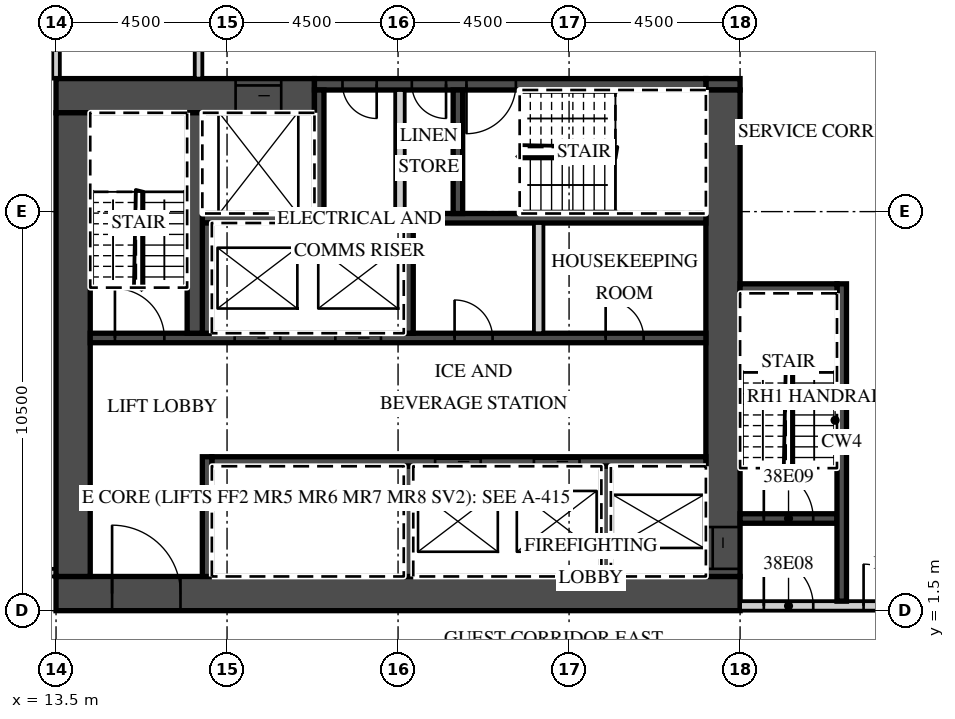
"""IFC4 building model, lengths in metres.
Left out: names, types, materials, properties, quantities, classifications, styles, units other than length and angle.
Written with IfcOpenShell. Run it as: python <this file> out.ifc"""

import sys

from ifc_helpers import new_model, si_unit, direction, frame, frame_2d, origin, place, context, subcontext, project, spatial, rectangle, extrude, element, fill, save


model = new_model("IFC4")
c1 = context("Model", 3, precision=1e-05, world=origin(), true_north=direction((0.0, 1.0)))
c2 = subcontext(c1, "Body", "Model", "MODEL_VIEW")
j1 = project(units=[si_unit("LENGTHUNIT", "METRE"), si_unit("PLANEANGLEUNIT", "RADIAN")], contexts=[c1])
p1 = place(None, origin())
s1 = spatial("IfcSite", under=j1, at=p1, CompositionType="ELEMENT")
p2 = place(p1, origin())
s2 = spatial("IfcBuilding", under=s1, at=p2, CompositionType="ELEMENT")
p3 = place(p2, frame((0.0, 0.0, 166.9)))
s3 = spatial("IfcBuildingStorey", under=s2, at=p3, CompositionType="ELEMENT", Elevation=166.9)
p4 = place(p3, frame((13.5, 15.5, 0.0), z_axis=(0.0, 0.0, 1.0), x_axis=(0.0, 1.0, 0.0)))
e1 = element("IfcWall", 1, at=p4, inside=s3, PredefinedType="PARTITIONING", context=c2, shape_type="SweptSolid", body=[
    extrude(rectangle(XDim=6.089, YDim=0.2, at=frame_2d((3.044, 0.0))), origin(), (0.0, 0.0, 1.0), 3.02),
])
p5 = place(p3, frame((-13.5, 2.5, 0.0), z_axis=(0.0, 0.0, 1.0), x_axis=(1.0, 0.0, 0.0)))
e2 = element("IfcWall", 2, at=p5, inside=s3, PredefinedType="PARTITIONING", context=c2, shape_type="SweptSolid", body=[
    extrude(rectangle(XDim=27.0, YDim=0.2, at=frame_2d((13.5, 0.0))), origin(), (0.0, 0.0, 1.0), 3.02),
])
p6 = place(p5, frame((0.575, 0.0, 0.0)))
e3 = element("IfcOpeningElement", 3, at=p6, cuts=e2, PredefinedType="OPENING", context=c2, shape_type="SweptSolid", body=[
    extrude(rectangle(XDim=1.0, YDim=2.1, at=frame_2d((0.5, 1.05))), frame((0.0, 0.11, 0.0), z_axis=(0.0, -1.0, 0.0), x_axis=(1.0, 0.0, 0.0)), (0.0, 0.0, 1.0), 0.22),
])
p7 = place(p5, frame((7.45, 0.0, 0.0)))
e4 = element("IfcOpeningElement", 4, at=p7, cuts=e2, PredefinedType="OPENING", context=c2, shape_type="SweptSolid", body=[
    extrude(rectangle(XDim=1.0, YDim=2.1, at=frame_2d((0.5, 1.05))), frame((0.0, 0.11, 0.0), z_axis=(0.0, -1.0, 0.0), x_axis=(1.0, 0.0, 0.0)), (0.0, 0.0, 1.0), 0.22),
])
p8 = place(p5, frame((11.925, 0.0, 0.0)))
e5 = element("IfcOpeningElement", 5, at=p8, cuts=e2, PredefinedType="OPENING", context=c2, shape_type="SweptSolid", body=[
    extrude(rectangle(XDim=1.0, YDim=2.1, at=frame_2d((0.5, 1.05))), frame((0.0, 0.11, 0.0), z_axis=(0.0, -1.0, 0.0), x_axis=(1.0, 0.0, 0.0)), (0.0, 0.0, 1.0), 0.22),
])
p9 = place(p5, frame((15.938, 0.0, 0.0)))
e6 = element("IfcOpeningElement", 6, at=p9, cuts=e2, PredefinedType="OPENING", context=c2, shape_type="SweptSolid", body=[
    extrude(rectangle(XDim=1.2, YDim=2.1, at=frame_2d((0.6, 1.05))), frame((0.0, 0.11, 0.0), z_axis=(0.0, -1.0, 0.0), x_axis=(1.0, 0.0, 0.0)), (0.0, 0.0, 1.0), 0.22),
])
p10 = place(p5, frame((25.425, 0.0, 0.0)))
e7 = element("IfcOpeningElement", 7, at=p10, cuts=e2, PredefinedType="OPENING", context=c2, shape_type="SweptSolid", body=[
    extrude(rectangle(XDim=1.0, YDim=2.1, at=frame_2d((0.5, 1.05))), frame((0.0, 0.11, 0.0), z_axis=(0.0, -1.0, 0.0), x_axis=(1.0, 0.0, 0.0)), (0.0, 0.0, 1.0), 0.22),
])
p11 = place(p3, frame((13.5, 1.95, 0.0), z_axis=(0.0, 0.0, 1.0), x_axis=(1.0, 0.0, 0.0)))
e8 = element("IfcWall", 8, at=p11, inside=s3, PredefinedType="SHEAR", context=c2, shape_type="SweptSolid", body=[
    extrude(rectangle(XDim=18.0, YDim=0.9, at=frame_2d((9.0, 0.0))), origin(), (0.0, 0.0, 1.0), 3.02),
])
p12 = place(p11, frame((1.475, 0.0, 0.0)))
e9 = element("IfcOpeningElement", 9, at=p12, cuts=e8, PredefinedType="OPENING", context=c2, shape_type="SweptSolid", body=[
    extrude(rectangle(XDim=1.8, YDim=2.1, at=frame_2d((0.9, 1.05))), frame((0.0, 0.46, 0.0), z_axis=(0.0, -1.0, 0.0), x_axis=(1.0, 0.0, 0.0)), (0.0, 0.0, 1.0), 0.92),
])
p13 = place(p3, frame((13.5, 15.05, 0.0), z_axis=(0.0, 0.0, 1.0), x_axis=(1.0, 0.0, 0.0)))
e10 = element("IfcWall", 10, at=p13, inside=s3, PredefinedType="SHEAR", context=c2, shape_type="SweptSolid", body=[
    extrude(rectangle(XDim=6.8, YDim=0.9, at=frame_2d((3.4, 0.0))), origin(), (0.0, 0.0, 1.0), 3.02),
])
p14 = place(p13, frame((4.725, 0.0, 0.0)))
e11 = element("IfcOpeningElement", 11, at=p14, cuts=e10, PredefinedType="OPENING", context=c2, shape_type="SweptSolid", body=[
    extrude(rectangle(XDim=1.2, YDim=2.1, at=frame_2d((0.6, 1.05))), frame((0.0, 0.46, 0.0), z_axis=(0.0, -1.0, 0.0), x_axis=(1.0, 0.0, 0.0)), (0.0, 0.0, 1.0), 0.92),
])
p15 = place(p3, frame((30.6, 15.35, 0.0), z_axis=(0.0, 0.0, 1.0), x_axis=(1.0, 0.0, 0.0)))
e12 = element("IfcWall", 12, at=p15, inside=s3, PredefinedType="SHEAR", context=c2, shape_type="SweptSolid", body=[
    extrude(rectangle(XDim=0.9, YDim=0.3, at=frame_2d((0.45, 0.0))), origin(), (0.0, 0.0, 1.0), 3.02),
])
p16 = place(p3, frame((20.3, 15.35, 0.0), z_axis=(0.0, 0.0, 1.0), x_axis=(1.0, 0.0, 0.0)))
e13 = element("IfcWall", 13, at=p16, inside=s3, PredefinedType="SHEAR", context=c2, shape_type="SweptSolid", body=[
    extrude(rectangle(XDim=10.3, YDim=0.3, at=frame_2d((5.15, 0.0))), origin(), (0.0, 0.0, 1.0), 3.02),
])
p17 = place(p16, frame((4.0, 0.0, 0.0)))
e14 = element("IfcOpeningElement", 14, at=p17, cuts=e13, PredefinedType="OPENING", context=c2, shape_type="SweptSolid", body=[
    extrude(rectangle(XDim=1.3, YDim=2.1, at=frame_2d((0.65, 1.05))), frame((0.0, 0.16, 0.0), z_axis=(0.0, -1.0, 0.0), x_axis=(1.0, 0.0, 0.0)), (0.0, 0.0, 1.0), 0.32),
])
p18 = place(p16, frame((2.562, 0.0, 0.0)))
e15 = element("IfcOpeningElement", 15, at=p18, cuts=e13, PredefinedType="OPENING", context=c2, shape_type="SweptSolid", body=[
    extrude(rectangle(XDim=0.9, YDim=2.1, at=frame_2d((0.45, 1.05))), frame((0.0, 0.16, 0.0), z_axis=(0.0, -1.0, 0.0), x_axis=(1.0, 0.0, 0.0)), (0.0, 0.0, 1.0), 0.32),
])
p19 = place(p16, frame((0.738, 0.0, 0.0)))
e16 = element("IfcOpeningElement", 16, at=p19, cuts=e13, PredefinedType="OPENING", context=c2, shape_type="SweptSolid", body=[
    extrude(rectangle(XDim=0.9, YDim=2.1, at=frame_2d((0.45, 1.05))), frame((0.0, 0.16, 0.0), z_axis=(0.0, -1.0, 0.0), x_axis=(1.0, 0.0, 0.0)), (0.0, 0.0, 1.0), 0.32),
])
p20 = place(p3, frame((31.05, 2.4, 0.0), z_axis=(0.0, 0.0, 1.0), x_axis=(0.0, 1.0, 0.0)))
e17 = element("IfcWall", 17, at=p20, inside=s3, PredefinedType="SHEAR", context=c2, shape_type="SweptSolid", body=[
    extrude(rectangle(XDim=12.8, YDim=0.9, at=frame_2d((6.4, 0.0))), origin(), (0.0, 0.0, 1.0), 3.02),
])
p21 = place(p20, frame((0.2, 0.0, 0.0)))
e18 = element("IfcOpeningElement", 18, at=p21, cuts=e17, PredefinedType="OPENING", context=c2, shape_type="SweptSolid", body=[
    extrude(rectangle(XDim=1.1, YDim=2.1, at=frame_2d((0.55, 1.05))), frame((0.0, 0.46, 0.0), z_axis=(0.0, -1.0, 0.0), x_axis=(1.0, 0.0, 0.0)), (0.0, 0.0, 1.0), 0.92),
])
p22 = place(p3, frame((13.95, 2.4, 0.0), z_axis=(0.0, 0.0, 1.0), x_axis=(0.0, 1.0, 0.0)))
e19 = element("IfcWall", 19, at=p22, inside=s3, PredefinedType="SHEAR", context=c2, shape_type="SweptSolid", body=[
    extrude(rectangle(XDim=12.2, YDim=0.9, at=frame_2d((6.1, 0.0))), origin(), (0.0, 0.0, 1.0), 3.02),
])
p23 = place(p3, frame((17.6, 5.425, 0.0), z_axis=(0.0, 0.0, 1.0), x_axis=(1.0, 0.0, 0.0)))
e20 = element("IfcWall", 20, at=p23, inside=s3, PredefinedType="SHEAR", context=c2, shape_type="SweptSolid", body=[
    extrude(rectangle(XDim=13.0, YDim=0.25, at=frame_2d((6.5, 0.0))), origin(), (0.0, 0.0, 1.0), 3.02),
])
p24 = place(p23, frame((8.475, 0.0, 0.0)))
e21 = element("IfcOpeningElement", 21, at=p24, cuts=e20, PredefinedType="OPENING", context=c2, shape_type="SweptSolid", body=[
    extrude(rectangle(XDim=1.2, YDim=2.1, at=frame_2d((0.6, 1.05))), frame((0.0, 0.135, 0.0), z_axis=(0.0, -1.0, 0.0), x_axis=(1.0, 0.0, 0.0)), (0.0, 0.0, 1.0), 0.27),
])
p25 = place(p23, frame((5.875, 0.0, 0.0)))
e22 = element("IfcOpeningElement", 22, at=p25, cuts=e20, PredefinedType="OPENING", context=c2, shape_type="SweptSolid", body=[
    extrude(rectangle(XDim=1.2, YDim=2.1, at=frame_2d((0.6, 1.05))), frame((0.0, 0.135, 0.0), z_axis=(0.0, -1.0, 0.0), x_axis=(1.0, 0.0, 0.0)), (0.0, 0.0, 1.0), 0.27),
])
p26 = place(p3, frame((17.475, 2.4, 0.0), z_axis=(0.0, 0.0, 1.0), x_axis=(0.0, 1.0, 0.0)))
e23 = element("IfcWall", 23, at=p26, inside=s3, PredefinedType="SHEAR", context=c2, shape_type="SweptSolid", body=[
    extrude(rectangle(XDim=3.15, YDim=0.25, at=frame_2d((1.575, 0.0))), origin(), (0.0, 0.0, 1.0), 3.02),
])
for number, where, z_axis, x_axis in (
    (24, (27.975, 2.4, 0.0), (0.0, 0.0, 1.0), (0.0, 1.0, 0.0)),
    (25, (22.775, 2.4, 0.0), (0.0, 0.0, 1.0), (0.0, 1.0, 0.0)),
):
    element("IfcWall", number, at=place(p3, frame(where, z_axis=z_axis, x_axis=x_axis)), inside=s3, PredefinedType="SHEAR", context=c2, shape_type="SweptSolid", body=[
        extrude(rectangle(XDim=2.9, YDim=0.25, at=frame_2d((1.45, 0.0))), origin(), (0.0, 0.0, 1.0), 3.02),
    ])
p27 = place(p3, frame((14.4, 8.675, 0.0), z_axis=(0.0, 0.0, 1.0), x_axis=(1.0, 0.0, 0.0)))
e26 = element("IfcWall", 26, at=p27, inside=s3, PredefinedType="SHEAR", context=c2, shape_type="SweptSolid", body=[
    extrude(rectangle(XDim=16.2, YDim=0.25, at=frame_2d((8.1, 0.0))), origin(), (0.0, 0.0, 1.0), 3.02),
])
p28 = place(p27, frame((6.45, 0.0, 0.0)))
e27 = element("IfcOpeningElement", 27, at=p28, cuts=e26, PredefinedType="OPENING", context=c2, shape_type="SweptSolid", body=[
    extrude(rectangle(XDim=1.2, YDim=2.1, at=frame_2d((0.6, 1.05))), frame((0.0, 0.135, 0.0), z_axis=(0.0, -1.0, 0.0), x_axis=(1.0, 0.0, 0.0)), (0.0, 0.0, 1.0), 0.27),
])
p29 = place(p27, frame((3.8, 0.0, 0.0)))
e28 = element("IfcOpeningElement", 28, at=p29, cuts=e26, PredefinedType="OPENING", context=c2, shape_type="SweptSolid", body=[
    extrude(rectangle(XDim=1.2, YDim=2.1, at=frame_2d((0.6, 1.05))), frame((0.0, 0.135, 0.0), z_axis=(0.0, -1.0, 0.0), x_axis=(1.0, 0.0, 0.0)), (0.0, 0.0, 1.0), 0.27),
])
p30 = place(p27, frame((0.65, 0.0, 0.0)))
e29 = element("IfcOpeningElement", 29, at=p30, cuts=e26, PredefinedType="OPENING", context=c2, shape_type="SweptSolid", body=[
    extrude(rectangle(XDim=1.3, YDim=2.1, at=frame_2d((0.65, 1.05))), frame((0.0, 0.135, 0.0), z_axis=(0.0, -1.0, 0.0), x_axis=(1.0, 0.0, 0.0)), (0.0, 0.0, 1.0), 0.27),
])
p31 = place(p27, frame((13.562, 0.0, 0.0)))
e30 = element("IfcOpeningElement", 30, at=p31, cuts=e26, PredefinedType="OPENING", context=c2, shape_type="SweptSolid", body=[
    extrude(rectangle(XDim=1.0, YDim=2.1, at=frame_2d((0.5, 1.05))), frame((0.0, 0.135, 0.0), z_axis=(0.0, -1.0, 0.0), x_axis=(1.0, 0.0, 0.0)), (0.0, 0.0, 1.0), 0.27),
])
p32 = place(p27, frame((9.587, 0.0, 0.0)))
e31 = element("IfcOpeningElement", 31, at=p32, cuts=e26, PredefinedType="OPENING", context=c2, shape_type="SweptSolid", body=[
    extrude(rectangle(XDim=1.0, YDim=2.1, at=frame_2d((0.5, 1.05))), frame((0.0, 0.135, 0.0), z_axis=(0.0, -1.0, 0.0), x_axis=(1.0, 0.0, 0.0)), (0.0, 0.0, 1.0), 0.27),
])
p33 = place(p3, frame((17.35, 11.825, 0.0), z_axis=(0.0, 0.0, 1.0), x_axis=(1.0, 0.0, 0.0)))
e32 = element("IfcWall", 32, at=p33, inside=s3, PredefinedType="SHEAR", context=c2, shape_type="SweptSolid", body=[
    extrude(rectangle(XDim=13.25, YDim=0.25, at=frame_2d((6.625, 0.0))), origin(), (0.0, 0.0, 1.0), 3.02),
])
for number, where, z_axis, x_axis in (
    (33, (17.475, 8.8, 0.0), (0.0, 0.0, 1.0), (0.0, 1.0, 0.0)),
    (34, (22.775, 8.8, 0.0), (0.0, 0.0, 1.0), (0.0, 1.0, 0.0)),
):
    element("IfcWall", number, at=place(p3, frame(where, z_axis=z_axis, x_axis=x_axis)), inside=s3, PredefinedType="SHEAR", context=c2, shape_type="SweptSolid", body=[
        extrude(rectangle(XDim=2.9, YDim=0.25, at=frame_2d((1.45, 0.0))), origin(), (0.0, 0.0, 1.0), 3.02),
    ])
p34 = place(p3, frame((26.2, 8.8, 0.0), z_axis=(0.0, 0.0, 1.0), x_axis=(0.0, 1.0, 0.0)))
e35 = element("IfcWall", 35, at=p34, inside=s3, PredefinedType="PARTITIONING", context=c2, shape_type="SweptSolid", body=[
    extrude(rectangle(XDim=2.9, YDim=0.25, at=frame_2d((1.45, 0.0))), origin(), (0.0, 0.0, 1.0), 3.02),
])
p35 = place(p3, frame((17.15, 8.8, 0.0), z_axis=(0.0, 0.0, 1.0), x_axis=(0.0, 1.0, 0.0)))
e36 = element("IfcWall", 36, at=p35, inside=s3, PredefinedType="SHEAR", context=c2, shape_type="SweptSolid", body=[
    extrude(rectangle(XDim=5.8, YDim=0.4, at=frame_2d((2.9, 0.0))), origin(), (0.0, 0.0, 1.0), 3.02),
])
for number, where, z_axis, x_axis in (
    (37, (20.425, 11.95, 0.0), (0.0, 0.0, 1.0), (0.0, 1.0, 0.0)),
    (38, (24.075, 11.95, 0.0), (0.0, 0.0, 1.0), (0.0, 1.0, 0.0)),
):
    element("IfcWall", number, at=place(p3, frame(where, z_axis=z_axis, x_axis=x_axis)), inside=s3, PredefinedType="SHEAR", context=c2, shape_type="SweptSolid", body=[
        extrude(rectangle(XDim=3.25, YDim=0.25, at=frame_2d((1.625, 0.0))), origin(), (0.0, 0.0, 1.0), 3.02),
    ])
p36 = place(p3, frame((22.55, 11.95, 0.0), z_axis=(0.0, 0.0, 1.0), x_axis=(0.0, 1.0, 0.0)))
e39 = element("IfcWall", 39, at=p36, inside=s3, PredefinedType="PARTITIONING", context=c2, shape_type="SweptSolid", body=[
    extrude(rectangle(XDim=3.25, YDim=0.25, at=frame_2d((1.625, 0.0))), origin(), (0.0, 0.0, 1.0), 3.02),
])
p37 = place(p3, frame((31.5, 1.625, 0.0), z_axis=(0.0, 0.0, 1.0), x_axis=(1.0, 0.0, 0.0)))
e40 = element("IfcWall", 40, at=p37, inside=s3, PredefinedType="PARTITIONING", context=c2, shape_type="SweptSolid", body=[
    extrude(rectangle(XDim=8.035, YDim=0.25, at=frame_2d((4.018, 0.0))), origin(), (0.0, 0.0, 1.0), 3.02),
])
p38 = place(p37, frame((0.625, 0.0, 0.0)))
e41 = element("IfcOpeningElement", 41, at=p38, cuts=e40, PredefinedType="OPENING", context=c2, shape_type="SweptSolid", body=[
    extrude(rectangle(XDim=1.3, YDim=2.1, at=frame_2d((0.65, 1.05))), frame((0.0, 0.135, 0.0), z_axis=(0.0, -1.0, 0.0), x_axis=(1.0, 0.0, 0.0)), (0.0, 0.0, 1.0), 0.27),
])
p39 = place(p37, frame((3.25, 0.0, 0.0)))
e42 = element("IfcOpeningElement", 42, at=p39, cuts=e40, PredefinedType="OPENING", context=c2, shape_type="SweptSolid", body=[
    extrude(rectangle(XDim=1.1, YDim=2.1, at=frame_2d((0.55, 1.05))), frame((0.0, 0.135, 0.0), z_axis=(0.0, -1.0, 0.0), x_axis=(1.0, 0.0, 0.0)), (0.0, 0.0, 1.0), 0.27),
])
p40 = place(p3, frame((31.5, 3.925, 0.0), z_axis=(0.0, 0.0, 1.0), x_axis=(1.0, 0.0, 0.0)))
e43 = element("IfcWall", 43, at=p40, inside=s3, PredefinedType="SHEAR", context=c2, shape_type="SweptSolid", body=[
    extrude(rectangle(XDim=2.55, YDim=0.25, at=frame_2d((1.275, 0.0))), origin(), (0.0, 0.0, 1.0), 3.02),
])
p41 = place(p40, frame((0.625, 0.0, 0.0)))
e44 = element("IfcOpeningElement", 44, at=p41, cuts=e43, PredefinedType="OPENING", context=c2, shape_type="SweptSolid", body=[
    extrude(rectangle(XDim=1.3, YDim=2.1, at=frame_2d((0.65, 1.05))), frame((0.0, 0.135, 0.0), z_axis=(0.0, -1.0, 0.0), x_axis=(1.0, 0.0, 0.0)), (0.0, 0.0, 1.0), 0.27),
])
p42 = place(p3, frame((34.175, 1.75, 0.0), z_axis=(0.0, 0.0, 1.0), x_axis=(0.0, 1.0, 0.0)))
e45 = element("IfcWall", 45, at=p42, inside=s3, PredefinedType="SHEAR", context=c2, shape_type="SweptSolid", body=[
    extrude(rectangle(XDim=8.35, YDim=0.25, at=frame_2d((4.175, 0.0))), origin(), (0.0, 0.0, 1.0), 3.02),
])
p43 = place(p3, frame((31.5, 9.975, 0.0), z_axis=(0.0, 0.0, 1.0), x_axis=(1.0, 0.0, 0.0)))
e46 = element("IfcWall", 46, at=p43, inside=s3, PredefinedType="SHEAR", context=c2, shape_type="SweptSolid", body=[
    extrude(rectangle(XDim=2.55, YDim=0.25, at=frame_2d((1.275, 0.0))), origin(), (0.0, 0.0, 1.0), 3.02),
])
p44 = place(p3, frame((17.25, 15.5, 0.0), z_axis=(0.0, 0.0, 1.0), x_axis=(0.0, 1.0, 0.0)))
e47 = element("IfcWall", 47, at=p44, inside=s3, PredefinedType="PARTITIONING", context=c2, shape_type="SweptSolid", body=[
    extrude(rectangle(XDim=2.2, YDim=0.2, at=frame_2d((1.1, 0.0))), origin(), (0.0, 0.0, 1.0), 3.02),
])
p45 = place(p28, origin())
e48 = element("IfcDoor", 48, at=p45, inside=s3, OperationType="SLIDING_TO_LEFT", PredefinedType="DOOR", context=c2, shape_type="SweptSolid", body=[
    extrude(rectangle(XDim=1.2, YDim=2.1, at=frame_2d((0.6, 1.05))), frame((0.0, 0.025, 0.0), z_axis=(0.0, -1.0, 0.0), x_axis=(1.0, 0.0, 0.0)), (0.0, 0.0, 1.0), 0.05),
])
fill(e27, e48)
p46 = place(p29, origin())
e49 = element("IfcDoor", 49, at=p46, inside=s3, OperationType="SLIDING_TO_RIGHT", PredefinedType="DOOR", context=c2, shape_type="SweptSolid", body=[
    extrude(rectangle(XDim=1.2, YDim=2.1, at=frame_2d((0.6, 1.05))), frame((0.0, 0.025, 0.0), z_axis=(0.0, -1.0, 0.0), x_axis=(1.0, 0.0, 0.0)), (0.0, 0.0, 1.0), 0.05),
])
fill(e28, e49)
p47 = place(p24, origin())
e50 = element("IfcDoor", 50, at=p47, inside=s3, OperationType="SLIDING_TO_LEFT", PredefinedType="DOOR", context=c2, shape_type="SweptSolid", body=[
    extrude(rectangle(XDim=1.2, YDim=2.1, at=frame_2d((0.6, 1.05))), frame((0.0, 0.025, 0.0), z_axis=(0.0, -1.0, 0.0), x_axis=(1.0, 0.0, 0.0)), (0.0, 0.0, 1.0), 0.05),
])
fill(e21, e50)
p48 = place(p25, origin())
e51 = element("IfcDoor", 51, at=p48, inside=s3, OperationType="SLIDING_TO_RIGHT", PredefinedType="DOOR", context=c2, shape_type="SweptSolid", body=[
    extrude(rectangle(XDim=1.2, YDim=2.1, at=frame_2d((0.6, 1.05))), frame((0.0, 0.025, 0.0), z_axis=(0.0, -1.0, 0.0), x_axis=(1.0, 0.0, 0.0)), (0.0, 0.0, 1.0), 0.05),
])
fill(e22, e51)
p49 = place(p14, origin())
e52 = element("IfcDoor", 52, at=p49, inside=s3, OperationType="SLIDING_TO_LEFT", PredefinedType="DOOR", context=c2, shape_type="SweptSolid", body=[
    extrude(rectangle(XDim=1.2, YDim=2.1, at=frame_2d((0.6, 1.05))), frame((0.0, 0.025, 0.0), z_axis=(0.0, -1.0, 0.0), x_axis=(1.0, 0.0, 0.0)), (0.0, 0.0, 1.0), 0.05),
])
fill(e11, e52)
p50 = place(p21, origin())
e53 = element("IfcDoor", 53, at=p50, inside=s3, OperationType="SLIDING_TO_LEFT", PredefinedType="DOOR", context=c2, shape_type="SweptSolid", body=[
    extrude(rectangle(XDim=1.1, YDim=2.1, at=frame_2d((0.55, 1.05))), frame((0.0, 0.025, 0.0), z_axis=(0.0, -1.0, 0.0), x_axis=(1.0, 0.0, 0.0)), (0.0, 0.0, 1.0), 0.05),
])
fill(e18, e53)
p51 = place(p12, origin())
e54 = element("IfcDoor", 54, at=p51, inside=s3, OperationType="DOUBLE_DOOR_DOUBLE_SWING", PredefinedType="DOOR", context=c2, shape_type="SweptSolid", body=[
    extrude(rectangle(XDim=1.8, YDim=2.1, at=frame_2d((0.9, 1.05))), frame((0.0, 0.025, 0.0), z_axis=(0.0, -1.0, 0.0), x_axis=(1.0, 0.0, 0.0)), (0.0, 0.0, 1.0), 0.05),
])
fill(e9, e54)
p52 = place(p38, origin())
e55 = element("IfcDoor", 55, at=p52, inside=s3, OperationType="SINGLE_SWING_LEFT", PredefinedType="DOOR", context=c2, shape_type="SweptSolid", body=[
    extrude(rectangle(XDim=1.3, YDim=2.1, at=frame_2d((0.65, 1.05))), frame((0.0, 0.025, 0.0), z_axis=(0.0, -1.0, 0.0), x_axis=(1.0, 0.0, 0.0)), (0.0, 0.0, 1.0), 0.05),
])
fill(e41, e55)
p53 = place(p41, origin())
e56 = element("IfcDoor", 56, at=p53, inside=s3, OperationType="SINGLE_SWING_LEFT", PredefinedType="DOOR", context=c2, shape_type="SweptSolid", body=[
    extrude(rectangle(XDim=1.3, YDim=2.1, at=frame_2d((0.65, 1.05))), frame((0.0, 0.025, 0.0), z_axis=(0.0, -1.0, 0.0), x_axis=(1.0, 0.0, 0.0)), (0.0, 0.0, 1.0), 0.05),
])
fill(e44, e56)
p54 = place(p39, origin())
e57 = element("IfcDoor", 57, at=p54, inside=s3, OperationType="SINGLE_SWING_LEFT", PredefinedType="DOOR", context=c2, shape_type="SweptSolid", body=[
    extrude(rectangle(XDim=1.1, YDim=2.1, at=frame_2d((0.55, 1.05))), frame((0.0, 0.025, 0.0), z_axis=(0.0, -1.0, 0.0), x_axis=(1.0, 0.0, 0.0)), (0.0, 0.0, 1.0), 0.05),
])
fill(e42, e57)
p55 = place(p30, origin())
e58 = element("IfcDoor", 58, at=p55, inside=s3, OperationType="SINGLE_SWING_LEFT", PredefinedType="DOOR", context=c2, shape_type="SweptSolid", body=[
    extrude(rectangle(XDim=1.3, YDim=2.1, at=frame_2d((0.65, 1.05))), frame((0.0, 0.025, 0.0), z_axis=(0.0, -1.0, 0.0), x_axis=(1.0, 0.0, 0.0)), (0.0, 0.0, 1.0), 0.05),
])
fill(e29, e58)
p56 = place(p17, origin())
e59 = element("IfcDoor", 59, at=p56, inside=s3, OperationType="SINGLE_SWING_LEFT", PredefinedType="DOOR", context=c2, shape_type="SweptSolid", body=[
    extrude(rectangle(XDim=1.3, YDim=2.1, at=frame_2d((0.65, 1.05))), frame((0.0, 0.025, 0.0), z_axis=(0.0, -1.0, 0.0), x_axis=(1.0, 0.0, 0.0)), (0.0, 0.0, 1.0), 0.05),
])
fill(e14, e59)
p57 = place(p18, origin())
e60 = element("IfcDoor", 60, at=p57, inside=s3, OperationType="SINGLE_SWING_RIGHT", PredefinedType="DOOR", context=c2, shape_type="SweptSolid", body=[
    extrude(rectangle(XDim=0.9, YDim=2.1, at=frame_2d((0.45, 1.05))), frame((0.0, 0.025, 0.0), z_axis=(0.0, -1.0, 0.0), x_axis=(1.0, 0.0, 0.0)), (0.0, 0.0, 1.0), 0.05),
])
fill(e15, e60)
p58 = place(p19, origin())
e61 = element("IfcDoor", 61, at=p58, inside=s3, OperationType="SINGLE_SWING_RIGHT", PredefinedType="DOOR", context=c2, shape_type="SweptSolid", body=[
    extrude(rectangle(XDim=0.9, YDim=2.1, at=frame_2d((0.45, 1.05))), frame((0.0, 0.025, 0.0), z_axis=(0.0, -1.0, 0.0), x_axis=(1.0, 0.0, 0.0)), (0.0, 0.0, 1.0), 0.05),
])
fill(e16, e61)
p59 = place(p31, origin())
e62 = element("IfcDoor", 62, at=p59, inside=s3, OperationType="SINGLE_SWING_LEFT", PredefinedType="DOOR", context=c2, shape_type="SweptSolid", body=[
    extrude(rectangle(XDim=1.0, YDim=2.1, at=frame_2d((0.5, 1.05))), frame((0.0, 0.025, 0.0), z_axis=(0.0, -1.0, 0.0), x_axis=(1.0, 0.0, 0.0)), (0.0, 0.0, 1.0), 0.05),
])
fill(e30, e62)
p60 = place(p32, origin())
e63 = element("IfcDoor", 63, at=p60, inside=s3, OperationType="SINGLE_SWING_LEFT", PredefinedType="DOOR", context=c2, shape_type="SweptSolid", body=[
    extrude(rectangle(XDim=1.0, YDim=2.1, at=frame_2d((0.5, 1.05))), frame((0.0, 0.025, 0.0), z_axis=(0.0, -1.0, 0.0), x_axis=(1.0, 0.0, 0.0)), (0.0, 0.0, 1.0), 0.05),
])
fill(e31, e63)
save(model, sys.argv[1])
